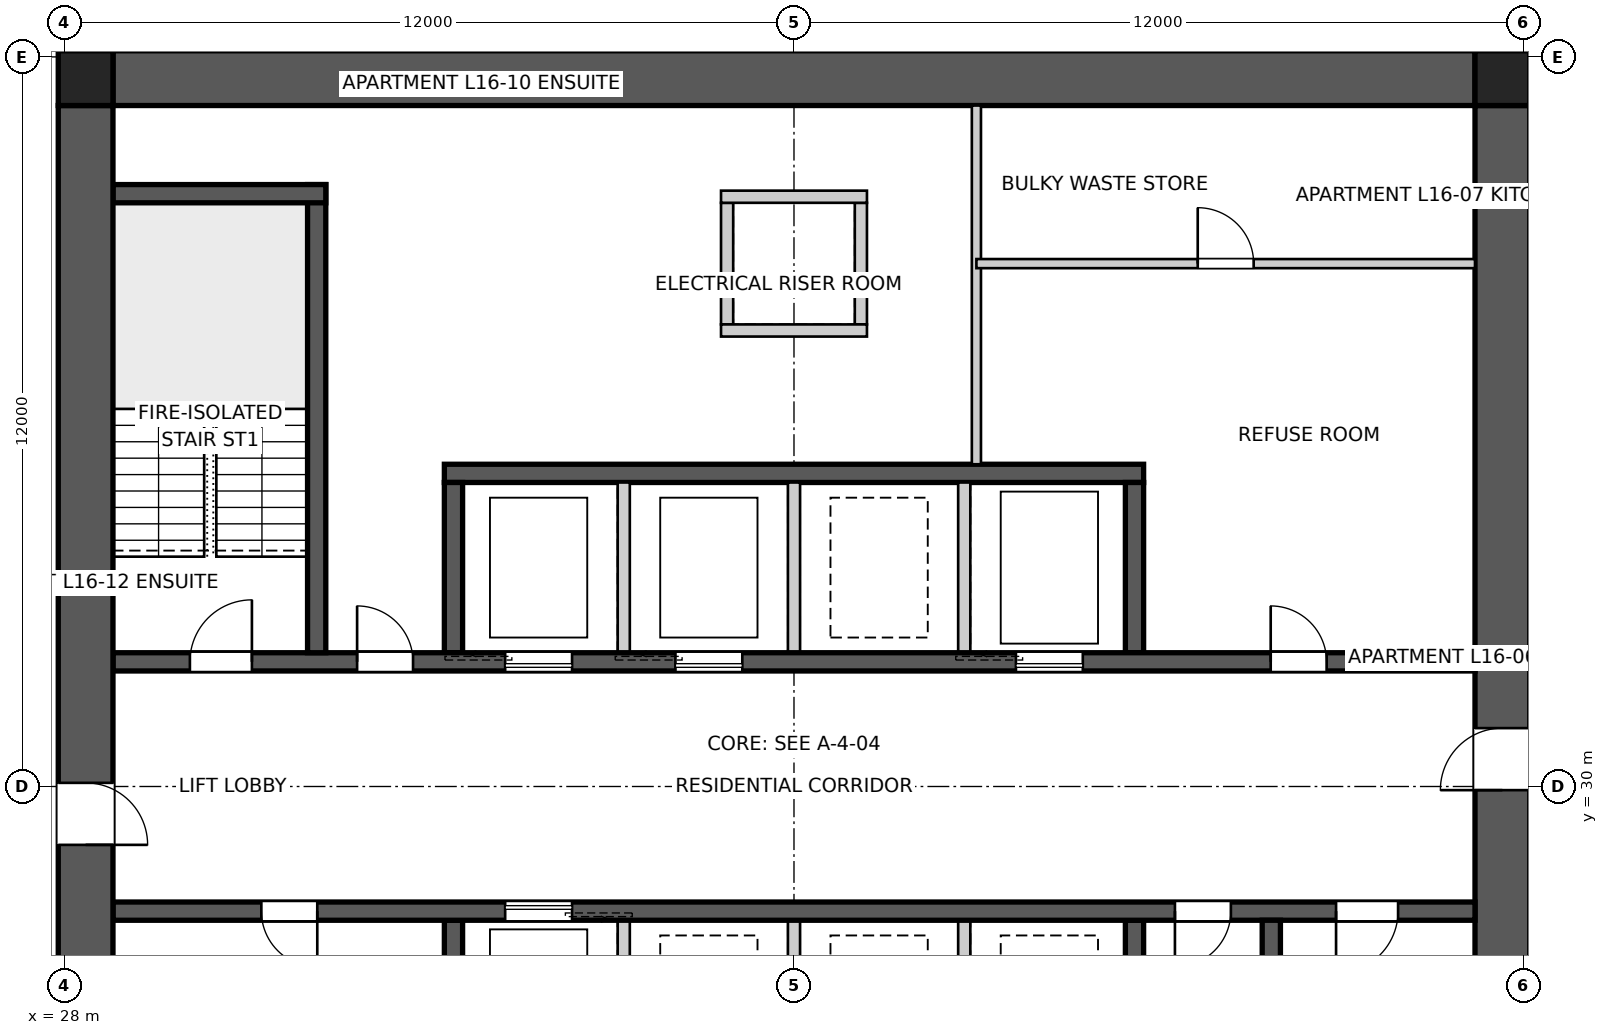
"""IFC4 building model, lengths in metres.
Left out: names, types, materials, properties, quantities, classifications, styles, units other than length and angle.
Written with IfcOpenShell. Run it as: python <this file> out.ifc"""

import sys

from ifc_helpers import new_model, si_unit, direction, frame, frame_2d, origin, origin_2d, place, context, subcontext, project, spatial, polyline, rectangle, outline, extrude, element, fill, save


model = new_model("IFC4")
c1 = context("Model", 3, precision=1e-05, world=origin(), true_north=direction((0.0, 1.0)))
c2 = subcontext(c1, "Body", "Model", "MODEL_VIEW")
j1 = project(units=[si_unit("LENGTHUNIT", "METRE"), si_unit("PLANEANGLEUNIT", "RADIAN")], contexts=[c1])
p1 = place(None, origin())
s1 = spatial("IfcSite", under=j1, at=p1, CompositionType="ELEMENT")
p2 = place(p1, origin())
s2 = spatial("IfcBuilding", under=s1, at=p2, CompositionType="ELEMENT")
p3 = place(p2, frame((0.0, 0.0, 60.8)))
s3 = spatial("IfcBuildingStorey", under=s2, at=p3, CompositionType="ELEMENT", Elevation=60.8)
p4 = place(p3, frame((28.8, 41.65, 0.0), z_axis=(0.0, 0.0, 1.0), x_axis=(1.0, 0.0, 0.0)))
e1 = element("IfcWall", 1, at=p4, inside=s3, PredefinedType="SHEAR", context=c2, shape_type="SweptSolid", body=[
    extrude(outline(polyline([(0.0, -0.45), (22.4, -0.45), (22.4, -0.025), (22.85, -0.025), (22.85, 0.025), (22.4, 0.025), (22.4, 0.45), (0.0, 0.45), (0.0, 0.025), (-0.45, 0.025), (-0.45, -0.025), (0.0, -0.025), (0.0, -0.45)])), origin(), (0.0, 0.0, 1.0), 3.4),
])
p5 = place(p3, frame((51.65, 18.8, 0.0), z_axis=(0.0, 0.0, 1.0), x_axis=(0.0, 1.0, 0.0)))
e2 = element("IfcWall", 2, at=p5, inside=s3, PredefinedType="SHEAR", context=c2, shape_type="SweptSolid", body=[
    extrude(outline(polyline([(0.0, -0.45), (22.4, -0.45), (22.4, -0.025), (22.85, -0.025), (22.85, 0.025), (22.4, 0.025), (22.4, 0.45), (0.0, 0.45), (0.0, 0.025), (-0.45, 0.025), (-0.45, -0.025), (0.0, -0.025), (0.0, -0.45)])), origin(), (0.0, 0.0, 1.0), 3.4),
])
p6 = place(p5, frame((11.14, 0.0, 0.0)))
e3 = element("IfcOpeningElement", 3, at=p6, cuts=e2, PredefinedType="OPENING", context=c2, shape_type="SweptSolid", body=[
    extrude(rectangle(XDim=1.02, YDim=2.4, at=frame_2d((0.51, 1.2))), frame((0.0, 0.46, 0.0), z_axis=(0.0, -1.0, 0.0), x_axis=(1.0, 0.0, 0.0)), (0.0, 0.0, 1.0), 0.92),
])
p7 = place(p3, frame((28.35, 41.2, 0.0), z_axis=(0.0, 0.0, 1.0), x_axis=(0.0, -1.0, 0.0)))
e4 = element("IfcWall", 4, at=p7, inside=s3, PredefinedType="SHEAR", context=c2, shape_type="SweptSolid", body=[
    extrude(outline(polyline([(0.0, -0.45), (22.4, -0.45), (22.4, -0.025), (22.85, -0.025), (22.85, 0.025), (22.4, 0.025), (22.4, 0.45), (0.0, 0.45), (0.0, 0.025), (-0.45, 0.025), (-0.45, -0.025), (0.0, -0.025), (0.0, -0.45)])), origin(), (0.0, 0.0, 1.0), 3.4),
])
p8 = place(p7, frame((11.14, 0.0, 0.0)))
e5 = element("IfcOpeningElement", 5, at=p8, cuts=e4, PredefinedType="OPENING", context=c2, shape_type="SweptSolid", body=[
    extrude(rectangle(XDim=1.02, YDim=2.4, at=frame_2d((0.51, 1.2))), frame((0.0, 0.46, 0.0), z_axis=(0.0, -1.0, 0.0), x_axis=(1.0, 0.0, 0.0)), (0.0, 0.0, 1.0), 0.92),
])
p9 = place(p3, frame((28.8, 32.05, 0.0), z_axis=(0.0, 0.0, 1.0), x_axis=(1.0, 0.0, 0.0)))
e6 = element("IfcWall", 6, at=p9, inside=s3, PredefinedType="SHEAR", context=c2, shape_type="SweptSolid", body=[
    extrude(rectangle(XDim=22.4, YDim=0.3, at=frame_2d((11.2, 0.0))), origin(), (0.0, 0.0, 1.0), 3.4),
])
p10 = place(p9, frame((19.04, 0.0, 0.0)))
e7 = element("IfcOpeningElement", 7, at=p10, cuts=e6, PredefinedType="OPENING", context=c2, shape_type="SweptSolid", body=[
    extrude(rectangle(XDim=0.92, YDim=2.1, at=frame_2d((0.46, 1.05))), frame((0.0, 0.16, 0.0), z_axis=(0.0, -1.0, 0.0), x_axis=(1.0, 0.0, 0.0)), (0.0, 0.0, 1.0), 0.32),
])
p11 = place(p9, frame((1.265, 0.0, 0.0)))
e8 = element("IfcOpeningElement", 8, at=p11, cuts=e6, PredefinedType="OPENING", context=c2, shape_type="SweptSolid", body=[
    extrude(rectangle(XDim=1.02, YDim=2.1, at=frame_2d((0.51, 1.05))), frame((0.0, 0.16, 0.0), z_axis=(0.0, -1.0, 0.0), x_axis=(1.0, 0.0, 0.0)), (0.0, 0.0, 1.0), 0.32),
])
p12 = place(p9, frame((4.015, 0.0, 0.0)))
e9 = element("IfcOpeningElement", 9, at=p12, cuts=e6, PredefinedType="OPENING", context=c2, shape_type="SweptSolid", body=[
    extrude(rectangle(XDim=0.92, YDim=2.1, at=frame_2d((0.46, 1.05))), frame((0.0, 0.16, 0.0), z_axis=(0.0, -1.0, 0.0), x_axis=(1.0, 0.0, 0.0)), (0.0, 0.0, 1.0), 0.32),
])
p13 = place(p9, frame((6.45, 0.0, 0.0)))
e10 = element("IfcOpeningElement", 10, at=p13, cuts=e6, PredefinedType="OPENING", context=c2, shape_type="SweptSolid", body=[
    extrude(rectangle(XDim=1.1, YDim=2.1, at=frame_2d((0.55, 1.05))), frame((0.0, 0.16, 0.0), z_axis=(0.0, -1.0, 0.0), x_axis=(1.0, 0.0, 0.0)), (0.0, 0.0, 1.0), 0.32),
])
p14 = place(p9, frame((9.25, 0.0, 0.0)))
e11 = element("IfcOpeningElement", 11, at=p14, cuts=e6, PredefinedType="OPENING", context=c2, shape_type="SweptSolid", body=[
    extrude(rectangle(XDim=1.1, YDim=2.1, at=frame_2d((0.55, 1.05))), frame((0.0, 0.16, 0.0), z_axis=(0.0, -1.0, 0.0), x_axis=(1.0, 0.0, 0.0)), (0.0, 0.0, 1.0), 0.32),
])
p15 = place(p9, frame((14.85, 0.0, 0.0)))
e12 = element("IfcOpeningElement", 12, at=p15, cuts=e6, PredefinedType="OPENING", context=c2, shape_type="SweptSolid", body=[
    extrude(rectangle(XDim=1.1, YDim=2.1, at=frame_2d((0.55, 1.05))), frame((0.0, 0.16, 0.0), z_axis=(0.0, -1.0, 0.0), x_axis=(1.0, 0.0, 0.0)), (0.0, 0.0, 1.0), 0.32),
])
p16 = place(p3, frame((51.2, 27.95, 0.0), z_axis=(0.0, 0.0, 1.0), x_axis=(-1.0, 0.0, 0.0)))
e13 = element("IfcWall", 13, at=p16, inside=s3, PredefinedType="SHEAR", context=c2, shape_type="SweptSolid", body=[
    extrude(rectangle(XDim=22.4, YDim=0.3, at=frame_2d((11.2, 0.0))), origin(), (0.0, 0.0, 1.0), 3.4),
])
p17 = place(p16, frame((19.04, 0.0, 0.0)))
e14 = element("IfcOpeningElement", 14, at=p17, cuts=e13, PredefinedType="OPENING", context=c2, shape_type="SweptSolid", body=[
    extrude(rectangle(XDim=0.92, YDim=2.1, at=frame_2d((0.46, 1.05))), frame((0.0, 0.16, 0.0), z_axis=(0.0, -1.0, 0.0), x_axis=(1.0, 0.0, 0.0)), (0.0, 0.0, 1.0), 0.32),
])
p18 = place(p16, frame((1.265, 0.0, 0.0)))
e15 = element("IfcOpeningElement", 15, at=p18, cuts=e13, PredefinedType="OPENING", context=c2, shape_type="SweptSolid", body=[
    extrude(rectangle(XDim=1.02, YDim=2.1, at=frame_2d((0.51, 1.05))), frame((0.0, 0.16, 0.0), z_axis=(0.0, -1.0, 0.0), x_axis=(1.0, 0.0, 0.0)), (0.0, 0.0, 1.0), 0.32),
])
p19 = place(p16, frame((4.015, 0.0, 0.0)))
e16 = element("IfcOpeningElement", 16, at=p19, cuts=e13, PredefinedType="OPENING", context=c2, shape_type="SweptSolid", body=[
    extrude(rectangle(XDim=0.92, YDim=2.1, at=frame_2d((0.46, 1.05))), frame((0.0, 0.16, 0.0), z_axis=(0.0, -1.0, 0.0), x_axis=(1.0, 0.0, 0.0)), (0.0, 0.0, 1.0), 0.32),
])
p20 = place(p16, frame((14.85, 0.0, 0.0)))
e17 = element("IfcOpeningElement", 17, at=p20, cuts=e13, PredefinedType="OPENING", context=c2, shape_type="SweptSolid", body=[
    extrude(rectangle(XDim=1.1, YDim=2.1, at=frame_2d((0.55, 1.05))), frame((0.0, 0.16, 0.0), z_axis=(0.0, -1.0, 0.0), x_axis=(1.0, 0.0, 0.0)), (0.0, 0.0, 1.0), 0.32),
])
p21 = place(p3, frame((34.25, 35.15, 0.0), z_axis=(0.0, 0.0, 1.0), x_axis=(1.0, 0.0, 0.0)))
e18 = element("IfcWall", 18, at=p21, inside=s3, PredefinedType="SHEAR", context=c2, shape_type="SweptSolid", body=[
    extrude(rectangle(XDim=11.5, YDim=0.3, at=frame_2d((5.75, 0.0))), origin(), (0.0, 0.0, 1.0), 3.4),
])
for number, where, z_axis, x_axis in (
    (19, (34.4, 32.2, 0.0), (0.0, 0.0, 1.0), (0.0, 1.0, 0.0)),
    (20, (45.6, 27.8, 0.0), (0.0, 0.0, 1.0), (0.0, -1.0, 0.0)),
):
    element("IfcWall", number, at=place(p3, frame(where, z_axis=z_axis, x_axis=x_axis)), inside=s3, PredefinedType="SHEAR", context=c2, shape_type="SweptSolid", body=[
        extrude(rectangle(XDim=2.8, YDim=0.3, at=frame_2d((1.4, 0.0))), origin(), (0.0, 0.0, 1.0), 3.4),
    ])
for number, where, z_axis, x_axis in (
    (21, (37.2, 32.2, 0.0), (0.0, 0.0, 1.0), (0.0, 1.0, 0.0)),
    (22, (42.8, 27.8, 0.0), (0.0, 0.0, 1.0), (0.0, -1.0, 0.0)),
    (23, (40.0, 32.2, 0.0), (0.0, 0.0, 1.0), (0.0, 1.0, 0.0)),
    (24, (40.0, 27.8, 0.0), (0.0, 0.0, 1.0), (0.0, -1.0, 0.0)),
    (25, (42.8, 32.2, 0.0), (0.0, 0.0, 1.0), (0.0, 1.0, 0.0)),
    (26, (37.2, 27.8, 0.0), (0.0, 0.0, 1.0), (0.0, -1.0, 0.0)),
):
    element("IfcWall", number, at=place(p3, frame(where, z_axis=z_axis, x_axis=x_axis)), inside=s3, PredefinedType="SOLIDWALL", context=c2, shape_type="SweptSolid", body=[
        extrude(rectangle(XDim=2.8, YDim=0.2, at=frame_2d((1.4, 0.0))), origin(), (0.0, 0.0, 1.0), 3.4),
    ])
for number, where, z_axis, x_axis in (
    (27, (45.6, 32.2, 0.0), (0.0, 0.0, 1.0), (0.0, 1.0, 0.0)),
    (28, (34.4, 27.8, 0.0), (0.0, 0.0, 1.0), (0.0, -1.0, 0.0)),
):
    element("IfcWall", number, at=place(p3, frame(where, z_axis=z_axis, x_axis=x_axis)), inside=s3, PredefinedType="SHEAR", context=c2, shape_type="SweptSolid", body=[
        extrude(rectangle(XDim=2.8, YDim=0.3, at=frame_2d((1.4, 0.0))), origin(), (0.0, 0.0, 1.0), 3.4),
    ])
p22 = place(p3, frame((32.15, 32.2, 0.0), z_axis=(0.0, 0.0, 1.0), x_axis=(0.0, 1.0, 0.0)))
e29 = element("IfcWall", 29, at=p22, inside=s3, PredefinedType="SHEAR", context=c2, shape_type="SweptSolid", body=[
    extrude(rectangle(XDim=7.7, YDim=0.3, at=frame_2d((3.85, 0.0))), origin(), (0.0, 0.0, 1.0), 3.4),
])
p23 = place(p3, frame((28.8, 39.75, 0.0), z_axis=(0.0, 0.0, 1.0), x_axis=(1.0, 0.0, 0.0)))
e30 = element("IfcWall", 30, at=p23, inside=s3, PredefinedType="SHEAR", context=c2, shape_type="SweptSolid", body=[
    extrude(rectangle(XDim=3.5, YDim=0.3, at=frame_2d((1.75, 0.0))), origin(), (0.0, 0.0, 1.0), 3.4),
])
p24 = place(p3, frame((47.85, 27.8, 0.0), z_axis=(0.0, 0.0, 1.0), x_axis=(0.0, -1.0, 0.0)))
e31 = element("IfcWall", 31, at=p24, inside=s3, PredefinedType="SHEAR", context=c2, shape_type="SweptSolid", body=[
    extrude(rectangle(XDim=7.7, YDim=0.3, at=frame_2d((3.85, 0.0))), origin(), (0.0, 0.0, 1.0), 3.4),
])
for number, where, z_axis, x_axis in (
    (32, (38.9, 37.6, 0.0), (0.0, 0.0, 1.0), (0.0, 1.0, 0.0)),
    (33, (41.1, 37.6, 0.0), (0.0, 0.0, 1.0), (0.0, 1.0, 0.0)),
):
    element("IfcWall", number, at=place(p3, frame(where, z_axis=z_axis, x_axis=x_axis)), inside=s3, PredefinedType="SOLIDWALL", context=c2, shape_type="SweptSolid", body=[
        extrude(rectangle(XDim=2.0, YDim=0.2, at=frame_2d((1.0, 0.0))), origin(), (0.0, 0.0, 1.0), 3.4),
    ])
for number, where, z_axis, x_axis in (
    (34, (38.8, 37.5, 0.0), (0.0, 0.0, 1.0), (1.0, 0.0, 0.0)),
    (35, (38.8, 39.7, 0.0), (0.0, 0.0, 1.0), (1.0, 0.0, 0.0)),
):
    element("IfcWall", number, at=place(p3, frame(where, z_axis=z_axis, x_axis=x_axis)), inside=s3, PredefinedType="SOLIDWALL", context=c2, shape_type="SweptSolid", body=[
        extrude(rectangle(XDim=2.4, YDim=0.2, at=frame_2d((1.2, 0.0))), origin(), (0.0, 0.0, 1.0), 3.4),
    ])
for number, where, z_axis, x_axis in (
    (36, (51.65, 41.65, 0.0), (0.0, 0.0, 1.0), (1.0, 0.0, 0.0)),
    (37, (28.35, 41.65, 0.0), (0.0, 0.0, 1.0), (1.0, 0.0, 0.0)),
):
    element("IfcColumn", number, at=place(p3, frame(where, z_axis=z_axis, x_axis=x_axis)), inside=s3, PredefinedType="COLUMN", context=c2, shape_type="SweptSolid", body=[
        extrude(rectangle(XDim=0.9, YDim=0.9, at=origin_2d()), origin(), (0.0, 0.0, 1.0), 3.4),
    ])
p25 = place(p3, frame((43.0, 41.2, 0.0), z_axis=(0.0, 0.0, 1.0), x_axis=(0.0, -1.0, 0.0)))
e38 = element("IfcWall", 38, at=p25, inside=s3, PredefinedType="SOLIDWALL", context=c2, shape_type="SweptSolid", body=[
    extrude(rectangle(XDim=5.9, YDim=0.15, at=frame_2d((2.95, 0.0))), origin(), (0.0, 0.0, 1.0), 3.25),
])
p26 = place(p3, frame((43.0, 38.6, 0.0), z_axis=(0.0, 0.0, 1.0), x_axis=(1.0, 0.0, 0.0)))
e39 = element("IfcWall", 39, at=p26, inside=s3, PredefinedType="SOLIDWALL", context=c2, shape_type="SweptSolid", body=[
    extrude(rectangle(XDim=8.2, YDim=0.15, at=frame_2d((4.1, 0.0))), origin(), (0.0, 0.0, 1.0), 3.25),
])
p27 = place(p26, frame((3.64, 0.0, 0.0)))
e40 = element("IfcOpeningElement", 40, at=p27, cuts=e39, PredefinedType="OPENING", context=c2, shape_type="SweptSolid", body=[
    extrude(rectangle(XDim=0.92, YDim=2.1, at=frame_2d((0.46, 1.05))), frame((0.0, 0.085, 0.0), z_axis=(0.0, -1.0, 0.0), x_axis=(1.0, 0.0, 0.0)), (0.0, 0.0, 1.0), 0.17),
])
p28 = place(p10, origin())
e41 = element("IfcDoor", 41, at=p28, inside=s3, OperationType="SINGLE_SWING_LEFT", PredefinedType="DOOR", context=c2, shape_type="SweptSolid", body=[
    extrude(rectangle(XDim=0.92, YDim=2.1, at=frame_2d((0.46, 1.05))), frame((0.0, 0.025, 0.0), z_axis=(0.0, -1.0, 0.0), x_axis=(1.0, 0.0, 0.0)), (0.0, 0.0, 1.0), 0.05),
])
fill(e7, e41)
p29 = place(p17, origin())
e42 = element("IfcDoor", 42, at=p29, inside=s3, OperationType="SINGLE_SWING_LEFT", PredefinedType="DOOR", context=c2, shape_type="SweptSolid", body=[
    extrude(rectangle(XDim=0.92, YDim=2.1, at=frame_2d((0.46, 1.05))), frame((0.0, 0.025, 0.0), z_axis=(0.0, -1.0, 0.0), x_axis=(1.0, 0.0, 0.0)), (0.0, 0.0, 1.0), 0.05),
])
fill(e14, e42)
p30 = place(p18, origin())
e43 = element("IfcDoor", 43, at=p30, inside=s3, OperationType="SINGLE_SWING_RIGHT", PredefinedType="DOOR", context=c2, shape_type="SweptSolid", body=[
    extrude(rectangle(XDim=1.02, YDim=2.1, at=frame_2d((0.51, 1.05))), frame((0.0, 0.025, 0.0), z_axis=(0.0, -1.0, 0.0), x_axis=(1.0, 0.0, 0.0)), (0.0, 0.0, 1.0), 0.05),
])
fill(e15, e43)
p31 = place(p11, origin())
e44 = element("IfcDoor", 44, at=p31, inside=s3, OperationType="SINGLE_SWING_RIGHT", PredefinedType="DOOR", context=c2, shape_type="SweptSolid", body=[
    extrude(rectangle(XDim=1.02, YDim=2.1, at=frame_2d((0.51, 1.05))), frame((0.0, 0.025, 0.0), z_axis=(0.0, -1.0, 0.0), x_axis=(1.0, 0.0, 0.0)), (0.0, 0.0, 1.0), 0.05),
])
fill(e8, e44)
p32 = place(p12, origin())
e45 = element("IfcDoor", 45, at=p32, inside=s3, OperationType="SINGLE_SWING_LEFT", PredefinedType="DOOR", context=c2, shape_type="SweptSolid", body=[
    extrude(rectangle(XDim=0.92, YDim=2.1, at=frame_2d((0.46, 1.05))), frame((0.0, 0.025, 0.0), z_axis=(0.0, -1.0, 0.0), x_axis=(1.0, 0.0, 0.0)), (0.0, 0.0, 1.0), 0.05),
])
fill(e9, e45)
p33 = place(p19, origin())
e46 = element("IfcDoor", 46, at=p33, inside=s3, OperationType="SINGLE_SWING_RIGHT", PredefinedType="DOOR", context=c2, shape_type="SweptSolid", body=[
    extrude(rectangle(XDim=0.92, YDim=2.1, at=frame_2d((0.46, 1.05))), frame((0.0, 0.025, 0.0), z_axis=(0.0, -1.0, 0.0), x_axis=(1.0, 0.0, 0.0)), (0.0, 0.0, 1.0), 0.05),
])
fill(e16, e46)
p34 = place(p27, origin())
e47 = element("IfcDoor", 47, at=p34, inside=s3, OperationType="SINGLE_SWING_LEFT", PredefinedType="DOOR", context=c2, shape_type="SweptSolid", body=[
    extrude(rectangle(XDim=0.92, YDim=2.1, at=frame_2d((0.46, 1.05))), frame((0.0, 0.025, 0.0), z_axis=(0.0, -1.0, 0.0), x_axis=(1.0, 0.0, 0.0)), (0.0, 0.0, 1.0), 0.05),
])
fill(e40, e47)
p35 = place(p6, origin())
e48 = element("IfcDoor", 48, at=p35, inside=s3, OperationType="SINGLE_SWING_LEFT", PredefinedType="DOOR", context=c2, shape_type="SweptSolid", body=[
    extrude(rectangle(XDim=1.02, YDim=2.4, at=frame_2d((0.51, 1.2))), frame((0.0, 0.025, 0.0), z_axis=(0.0, -1.0, 0.0), x_axis=(1.0, 0.0, 0.0)), (0.0, 0.0, 1.0), 0.05),
])
fill(e3, e48)
p36 = place(p8, origin())
e49 = element("IfcDoor", 49, at=p36, inside=s3, OperationType="SINGLE_SWING_RIGHT", PredefinedType="DOOR", context=c2, shape_type="SweptSolid", body=[
    extrude(rectangle(XDim=1.02, YDim=2.4, at=frame_2d((0.51, 1.2))), frame((0.0, 0.025, 0.0), z_axis=(0.0, -1.0, 0.0), x_axis=(1.0, 0.0, 0.0)), (0.0, 0.0, 1.0), 0.05),
])
fill(e5, e49)
p37 = place(p13, origin())
e50 = element("IfcDoor", 50, at=p37, inside=s3, OperationType="SLIDING_TO_LEFT", PredefinedType="DOOR", context=c2, shape_type="SweptSolid", body=[
    extrude(rectangle(XDim=1.1, YDim=2.1, at=frame_2d((0.55, 1.05))), frame((0.0, 0.025, 0.0), z_axis=(0.0, -1.0, 0.0), x_axis=(1.0, 0.0, 0.0)), (0.0, 0.0, 1.0), 0.05),
])
fill(e10, e50)
p38 = place(p14, origin())
e51 = element("IfcDoor", 51, at=p38, inside=s3, OperationType="SLIDING_TO_LEFT", PredefinedType="DOOR", context=c2, shape_type="SweptSolid", body=[
    extrude(rectangle(XDim=1.1, YDim=2.1, at=frame_2d((0.55, 1.05))), frame((0.0, 0.025, 0.0), z_axis=(0.0, -1.0, 0.0), x_axis=(1.0, 0.0, 0.0)), (0.0, 0.0, 1.0), 0.05),
])
fill(e11, e51)
p39 = place(p15, origin())
e52 = element("IfcDoor", 52, at=p39, inside=s3, OperationType="SLIDING_TO_LEFT", PredefinedType="DOOR", context=c2, shape_type="SweptSolid", body=[
    extrude(rectangle(XDim=1.1, YDim=2.1, at=frame_2d((0.55, 1.05))), frame((0.0, 0.025, 0.0), z_axis=(0.0, -1.0, 0.0), x_axis=(1.0, 0.0, 0.0)), (0.0, 0.0, 1.0), 0.05),
])
fill(e12, e52)
p40 = place(p20, origin())
e53 = element("IfcDoor", 53, at=p40, inside=s3, OperationType="SLIDING_TO_LEFT", PredefinedType="DOOR", context=c2, shape_type="SweptSolid", body=[
    extrude(rectangle(XDim=1.1, YDim=2.1, at=frame_2d((0.55, 1.05))), frame((0.0, 0.025, 0.0), z_axis=(0.0, -1.0, 0.0), x_axis=(1.0, 0.0, 0.0)), (0.0, 0.0, 1.0), 0.05),
])
fill(e17, e53)
save(model, sys.argv[1])
